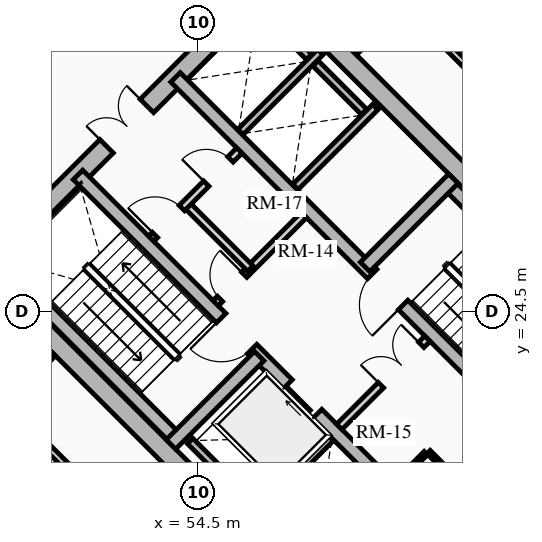
"""IFC4 building model, lengths in metres.
Left out: names, types, materials, properties, quantities, classifications, styles, units other than length and angle.
Written with IfcOpenShell. Run it as: python <this file> out.ifc"""

import sys

from ifc_helpers import new_model, si_unit, direction, frame, frame_2d, origin, place, context, subcontext, project, spatial, rectangle, extrude, source, transform, mapped, element, fill, save


model = new_model("IFC4")
c1 = context("Model", 3, precision=1e-05, world=origin(), true_north=direction((0.0, 1.0)))
c2 = subcontext(c1, "Body", "Model", "MODEL_VIEW")
j1 = project(units=[si_unit("LENGTHUNIT", "METRE"), si_unit("PLANEANGLEUNIT", "RADIAN")], contexts=[c1])
p1 = place(None, origin())
s1 = spatial("IfcSite", under=j1, at=p1, CompositionType="ELEMENT")
p2 = place(p1, origin())
s2 = spatial("IfcBuilding", under=s1, at=p2, CompositionType="ELEMENT")
p3 = place(p2, frame((0.0, 0.0, 65.65)))
s3 = spatial("IfcBuildingStorey", under=s2, at=p3, CompositionType="ELEMENT", Elevation=65.65)
for number, where, z_axis, x_axis in (
    (1, (58.773, 15.661, 0.0), (0.0, 0.0, 1.0), (-0.707, 0.707, 0.0)),
    (2, (66.339, 23.227, 0.0), (0.0, 0.0, 1.0), (-0.707, 0.707, 0.0)),
):
    element("IfcWall", number, at=place(p3, frame(where, z_axis=z_axis, x_axis=x_axis)), inside=s3, PredefinedType="SHEAR", context=c2, shape_type="SweptSolid", body=[
        extrude(rectangle(XDim=14.3, YDim=0.5, at=frame_2d((7.15, 0.0))), origin(), (0.0, 0.0, 1.0), 4.5),
    ])
p4 = place(p3, frame((58.596, 15.838, 0.0), z_axis=(0.0, 0.0, 1.0), x_axis=(0.707106781187, 0.707106781187, 0.0)))
e3 = element("IfcWall", 3, at=p4, inside=s3, PredefinedType="SHEAR", context=c2, shape_type="SweptSolid", body=[
    extrude(rectangle(XDim=10.7, YDim=0.5, at=frame_2d((5.35, 0.0))), origin(), (0.0, 0.0, 1.0), 4.5),
])
m1 = source(origin(), c2, "Body", "SweptSolid", [
    extrude(rectangle(XDim=1.5, YDim=2.02, at=frame_2d((0.75, 1.01))), frame((0.0, 0.26, 0.0), z_axis=(0.0, -1.0, 0.0), x_axis=(1.0, 0.0, 0.0)), (0.0, 0.0, 1.0), 0.52),
])
p5 = place(p4, frame((5.45, 0.0, 0.0)))
e4 = element("IfcOpeningElement", 4, at=p5, cuts=e3, PredefinedType="OPENING", context=c2, shape_type="MappedRepresentation", body=[
    mapped(m1, transform((0.0, 0.0, 0.0), x_axis=(1.0, 0.0, 0.0), y_axis=(0.0, 1.0, 0.0), z_axis=(0.0, 0.0, 1.0), scale=1.0)),
])
p6 = place(p3, frame((48.838, 25.596, 0.0), z_axis=(0.0, 0.0, 1.0), x_axis=(0.707106781187, 0.707106781187, 0.0)))
e5 = element("IfcWall", 5, at=p6, inside=s3, PredefinedType="SHEAR", context=c2, shape_type="SweptSolid", body=[
    extrude(rectangle(XDim=10.7, YDim=0.5, at=frame_2d((5.35, 0.0))), origin(), (0.0, 0.0, 1.0), 4.5),
])
p7 = place(p6, frame((4.6, 0.0, 0.0)))
e6 = element("IfcOpeningElement", 6, at=p7, cuts=e5, PredefinedType="OPENING", context=c2, shape_type="MappedRepresentation", body=[
    mapped(m1, transform((0.0, 0.0, 0.0), x_axis=(1.0, 0.0, 0.0), y_axis=(0.0, 1.0, 0.0), z_axis=(0.0, 0.0, 1.0), scale=1.0)),
])
p8 = place(p3, frame((61.096, 18.338, 0.0), z_axis=(0.0, 0.0, 1.0), x_axis=(-0.707106781187, 0.707106781187, 0.0)))
e7 = element("IfcWall", 7, at=p8, inside=s3, PredefinedType="SHEAR", context=c2, shape_type="SweptSolid", body=[
    extrude(rectangle(XDim=13.8, YDim=0.35, at=frame_2d((6.9, 0.0))), origin(), (0.0, 0.0, 1.0), 4.5),
])
m2 = source(origin(), c2, "Body", "SweptSolid", [
    extrude(rectangle(XDim=1.1, YDim=2.015, at=frame_2d((0.55, 1.007))), frame((0.0, 0.185, 0.0), z_axis=(0.0, -1.0, 0.0), x_axis=(1.0, 0.0, 0.0)), (0.0, 0.0, 1.0), 0.37),
])
p9 = place(p8, frame((4.9, 0.0, 0.0)))
e8 = element("IfcOpeningElement", 8, at=p9, cuts=e7, PredefinedType="OPENING", context=c2, shape_type="MappedRepresentation", body=[
    mapped(m2, transform((0.0, 0.0, 0.0), x_axis=(1.0, 0.0, 0.0), y_axis=(0.0, 1.0, 0.0), z_axis=(0.0, 0.0, 1.0), scale=1.0)),
])
m3 = source(origin(), c2, "Body", "SweptSolid", [
    extrude(rectangle(XDim=1.15, YDim=2.02, at=frame_2d((0.575, 1.01))), frame((0.0, 0.185, 0.0), z_axis=(0.0, -1.0, 0.0), x_axis=(1.0, 0.0, 0.0)), (0.0, 0.0, 1.0), 0.37),
])
p10 = place(p8, frame((7.32, 0.0, 0.0)))
e9 = element("IfcOpeningElement", 9, at=p10, cuts=e7, PredefinedType="OPENING", context=c2, shape_type="MappedRepresentation", body=[
    mapped(m3, transform((0.0, 0.0, 0.0), x_axis=(1.0, 0.0, 0.0), y_axis=(0.0, 1.0, 0.0), z_axis=(0.0, 0.0, 1.0), scale=1.0)),
])
p11 = place(p3, frame((63.662, 20.904, 0.0), z_axis=(0.0, 0.0, 1.0), x_axis=(-0.707106781187, 0.707106781187, 0.0)))
e10 = element("IfcWall", 10, at=p11, inside=s3, PredefinedType="SHEAR", context=c2, shape_type="SweptSolid", body=[
    extrude(rectangle(XDim=13.8, YDim=0.35, at=frame_2d((6.9, 0.0))), origin(), (0.0, 0.0, 1.0), 4.5),
])
p12 = place(p11, frame((5.33, 0.0, 0.0)))
e11 = element("IfcOpeningElement", 11, at=p12, cuts=e10, PredefinedType="OPENING", context=c2, shape_type="MappedRepresentation", body=[
    mapped(m3, transform((0.0, 0.0, 0.0), x_axis=(1.0, 0.0, 0.0), y_axis=(0.0, 1.0, 0.0), z_axis=(0.0, 0.0, 1.0), scale=1.0)),
])
p13 = place(p3, frame((53.922, 21.141, 0.0), z_axis=(0.0, 0.0, 1.0), x_axis=(-0.707106781187, 0.707106781187, 0.0)))
e12 = element("IfcWall", 12, at=p13, inside=s3, PredefinedType="SHEAR", context=c2, shape_type="SweptSolid", body=[
    extrude(rectangle(XDim=6.745, YDim=0.35, at=frame_2d((3.373, 0.0))), origin(), (0.0, 0.0, 1.0), 4.5),
])
p14 = place(p3, frame((53.784, 21.003, 0.0), z_axis=(0.0, 0.0, 1.0), x_axis=(0.707106781187, 0.707106781187, 0.0)))
e13 = element("IfcWall", 13, at=p14, inside=s3, PredefinedType="SHEAR", context=c2, shape_type="SweptSolid", body=[
    extrude(rectangle(XDim=3.285, YDim=0.35, at=frame_2d((1.643, 0.0))), origin(), (0.0, 0.0, 1.0), 4.5),
])
p15 = place(p3, frame((65.847, 23.089, 0.0), z_axis=(0.0, 0.0, 1.0), x_axis=(-0.707106781187, 0.707106781187, 0.0)))
e14 = element("IfcWall", 14, at=p15, inside=s3, PredefinedType="SHEAR", context=c2, shape_type="SweptSolid", body=[
    extrude(rectangle(XDim=6.745, YDim=0.35, at=frame_2d((3.373, 0.0))), origin(), (0.0, 0.0, 1.0), 4.5),
])
p16 = place(p3, frame((58.893, 25.674, 0.0), z_axis=(0.0, 0.0, 1.0), x_axis=(0.707106781187, 0.707106781187, 0.0)))
e15 = element("IfcWall", 15, at=p16, inside=s3, PredefinedType="SHEAR", context=c2, shape_type="SweptSolid", body=[
    extrude(rectangle(XDim=3.285, YDim=0.35, at=frame_2d((1.643, 0.0))), origin(), (0.0, 0.0, 1.0), 4.5),
])
p17 = place(p3, frame((55.888, 19.069, 0.0), z_axis=(0.0, 0.0, 1.0), x_axis=(0.707106781187, 0.707106781187, 0.0)))
e16 = element("IfcWall", 16, at=p17, inside=s3, PredefinedType="SHEAR", context=c2, shape_type="SweptSolid", body=[
    extrude(rectangle(XDim=2.97, YDim=0.2, at=frame_2d((1.485, 0.0))), origin(), (0.0, 0.0, 1.0), 4.5),
])
p18 = place(p3, frame((56.015, 19.366, 0.0), z_axis=(0.0, 0.0, 1.0), x_axis=(-0.707106781187, 0.707106781187, 0.0)))
e17 = element("IfcWall", 17, at=p18, inside=s3, PredefinedType="SHEAR", context=c2, shape_type="SweptSolid", body=[
    extrude(rectangle(XDim=2.44, YDim=0.2, at=frame_2d((1.22, 0.0))), origin(), (0.0, 0.0, 1.0), 4.5),
])
p19 = place(p3, frame((57.062, 27.781, 0.0), z_axis=(0.0, 0.0, 1.0), x_axis=(0.707106781187, 0.707106781187, 0.0)))
e18 = element("IfcWall", 18, at=p19, inside=s3, PredefinedType="SHEAR", context=c2, shape_type="SweptSolid", body=[
    extrude(rectangle(XDim=2.97, YDim=0.2, at=frame_2d((1.485, 0.0))), origin(), (0.0, 0.0, 1.0), 4.5),
])
p20 = place(p3, frame((55.615, 29.227, 0.0), z_axis=(0.0, 0.0, 1.0), x_axis=(0.707147878904, 0.70706568108, 0.0)))
e19 = element("IfcWall", 19, at=p20, inside=s3, PredefinedType="SHEAR", context=c2, shape_type="SweptSolid", body=[
    extrude(rectangle(XDim=2.97, YDim=0.2, at=frame_2d((1.485, 0.0))), origin(), (0.0, 0.0, 1.0), 4.5),
])
p21 = place(p3, frame((58.865, 29.754, 0.0), z_axis=(0.0, 0.0, 1.0), x_axis=(-0.707174411312, 0.707039144592, 0.0)))
e20 = element("IfcWall", 20, at=p21, inside=s3, PredefinedType="SHEAR", context=c2, shape_type="SweptSolid", body=[
    extrude(rectangle(XDim=1.805, YDim=0.2, at=frame_2d((0.902, 0.0))), origin(), (0.0, 0.0, 1.0), 4.5),
])
p22 = place(p3, frame((57.419, 31.2, 0.0), z_axis=(0.0, 0.0, 1.0), x_axis=(-0.707032117043, 0.707181437447, 0.0)))
e21 = element("IfcWall", 21, at=p22, inside=s3, PredefinedType="SHEAR", context=c2, shape_type="SweptSolid", body=[
    extrude(rectangle(XDim=1.635, YDim=0.2, at=frame_2d((0.817, 0.0))), origin(), (0.0, 0.0, 1.0), 4.5),
])
p23 = place(p3, frame((58.214, 21.467, 0.0), z_axis=(0.0, 0.0, 1.0), x_axis=(0.707106781187, 0.707106781187, 0.0)))
e22 = element("IfcWall", 22, at=p23, inside=s3, PredefinedType="PARTITIONING", context=c2, shape_type="SweptSolid", body=[
    extrude(rectangle(XDim=3.28, YDim=0.2, at=frame_2d((1.64, 0.0))), origin(), (0.0, 0.0, 1.0), 4.245),
])
m4 = source(origin(), c2, "Body", "SweptSolid", [
    extrude(rectangle(XDim=1.5, YDim=2.02, at=frame_2d((0.75, 1.01))), frame((0.0, 0.11, 0.0), z_axis=(0.0, -1.0, 0.0), x_axis=(1.0, 0.0, 0.0)), (0.0, 0.0, 1.0), 0.22),
])
p24 = place(p23, frame((1.55, 0.0, 0.0)))
e23 = element("IfcOpeningElement", 23, at=p24, cuts=e22, PredefinedType="OPENING", context=c2, shape_type="MappedRepresentation", body=[
    mapped(m4, transform((0.0, 0.0, 0.0), x_axis=(1.0, 0.0, 0.0), y_axis=(0.0, 1.0, 0.0), z_axis=(0.0, 0.0, 1.0), scale=1.0)),
])
p25 = place(p3, frame((54.961, 24.719, 0.0), z_axis=(0.0, 0.0, 1.0), x_axis=(0.707106781187, 0.707106781187, 0.0)))
e24 = element("IfcWall", 24, at=p25, inside=s3, PredefinedType="PARTITIONING", context=c2, shape_type="SweptSolid", body=[
    extrude(rectangle(XDim=3.28, YDim=0.2, at=frame_2d((1.64, 0.0))), origin(), (0.0, 0.0, 1.0), 4.245),
])
m5 = source(origin(), c2, "Body", "SweptSolid", [
    extrude(rectangle(XDim=0.9, YDim=2.005, at=frame_2d((0.45, 1.002))), frame((0.0, 0.11, 0.0), z_axis=(0.0, -1.0, 0.0), x_axis=(1.0, 0.0, 0.0)), (0.0, 0.0, 1.0), 0.22),
])
p26 = place(p25, frame((0.16, 0.0, 0.0)))
e25 = element("IfcOpeningElement", 25, at=p26, cuts=e24, PredefinedType="OPENING", context=c2, shape_type="MappedRepresentation", body=[
    mapped(m5, transform((0.0, 0.0, 0.0), x_axis=(1.0, 0.0, 0.0), y_axis=(0.0, 1.0, 0.0), z_axis=(0.0, 0.0, 1.0), scale=1.0)),
])
p27 = place(p3, frame((55.874, 25.631, 0.0), z_axis=(0.0, 0.0, 1.0), x_axis=(-0.707157639372, 0.707055919343, 0.0)))
e26 = element("IfcWall", 26, at=p27, inside=s3, PredefinedType="PARTITIONING", context=c2, shape_type="SweptSolid", body=[
    extrude(rectangle(XDim=2.4, YDim=0.2, at=frame_2d((1.2, 0.0))), origin(), (0.0, 0.0, 1.0), 4.245),
])
p28 = place(p3, frame((53.264, 26.416, 0.0), z_axis=(0.0, 0.0, 1.0), x_axis=(0.707106781187, 0.707106781187, 0.0)))
e27 = element("IfcWall", 27, at=p28, inside=s3, PredefinedType="PARTITIONING", context=c2, shape_type="SweptSolid", body=[
    extrude(rectangle(XDim=3.28, YDim=0.2, at=frame_2d((1.64, 0.0))), origin(), (0.0, 0.0, 1.0), 4.245),
])
m6 = source(origin(), c2, "Body", "SweptSolid", [
    extrude(rectangle(XDim=1.0, YDim=2.015, at=frame_2d((0.5, 1.007))), frame((0.0, 0.11, 0.0), z_axis=(0.0, -1.0, 0.0), x_axis=(1.0, 0.0, 0.0)), (0.0, 0.0, 1.0), 0.22),
])
p29 = place(p28, frame((0.14, 0.0, 0.0)))
e28 = element("IfcOpeningElement", 28, at=p29, cuts=e27, PredefinedType="OPENING", context=c2, shape_type="MappedRepresentation", body=[
    mapped(m6, transform((0.0, 0.0, 0.0), x_axis=(1.0, 0.0, 0.0), y_axis=(0.0, 1.0, 0.0), z_axis=(0.0, 0.0, 1.0), scale=1.0)),
])
p30 = place(p28, frame((2.05, 0.0, 0.0)))
e29 = element("IfcOpeningElement", 29, at=p30, cuts=e27, PredefinedType="OPENING", context=c2, shape_type="MappedRepresentation", body=[
    mapped(m5, transform((0.0, 0.0, 0.0), x_axis=(1.0, 0.0, 0.0), y_axis=(0.0, 1.0, 0.0), z_axis=(0.0, 0.0, 1.0), scale=1.0)),
])
p31 = place(p3, frame((61.835, 19.529, 0.0), z_axis=(0.0, 0.0, 1.0), x_axis=(-0.707174592913, 0.707038962956, 0.0)))
e30 = element("IfcWall", 30, at=p31, inside=s3, PredefinedType="PARTITIONING", context=c2, shape_type="SweptSolid", body=[
    extrude(rectangle(XDim=1.8, YDim=0.125, at=frame_2d((0.9, 0.0))), origin(), (0.0, 0.0, 1.0), 4.245),
])
m7 = source(origin(), c2, "Body", "SweptSolid", [
    extrude(rectangle(XDim=0.9, YDim=2.005, at=frame_2d((0.45, 1.002))), frame((0.0, 0.073, 0.0), z_axis=(0.0, -1.0, 0.0), x_axis=(1.0, 0.0, 0.0)), (0.0, 0.0, 1.0), 0.145),
])
p32 = place(p31, frame((0.42, 0.0, 0.0)))
e31 = element("IfcOpeningElement", 31, at=p32, cuts=e30, PredefinedType="OPENING", context=c2, shape_type="MappedRepresentation", body=[
    mapped(m7, transform((0.0, 0.0, 0.0), x_axis=(1.0, 0.0, 0.0), y_axis=(0.0, 1.0, 0.0), z_axis=(0.0, 0.0, 1.0), scale=1.0)),
])
p33 = place(p3, frame((59.713, 19.996, 0.0), z_axis=(0.0, 0.0, 1.0), x_axis=(0.707217726, 0.706995818963, 0.0)))
e32 = element("IfcWall", 32, at=p33, inside=s3, PredefinedType="PARTITIONING", context=c2, shape_type="SweptSolid", body=[
    extrude(rectangle(XDim=1.1, YDim=0.125, at=frame_2d((0.55, 0.0))), origin(), (0.0, 0.0, 1.0), 4.245),
])
p34 = place(p3, frame((58.419, 13.045, 0.0), z_axis=(0.0, 0.0, 1.0), x_axis=(0.707106781187, 0.707106781187, 0.0)))
e33 = element("IfcWall", 33, at=p34, inside=s3, PredefinedType="PARTITIONING", context=c2, shape_type="SweptSolid", body=[
    extrude(rectangle(XDim=14.9, YDim=0.18, at=frame_2d((7.45, 0.0))), origin(), (0.0, 0.0, 1.0), 3.536),
])
m8 = source(origin(), c2, "Body", "SweptSolid", [
    extrude(rectangle(XDim=1.4, YDim=2.02, at=frame_2d((0.7, 1.01))), frame((0.0, 0.1, 0.0), z_axis=(0.0, -1.0, 0.0), x_axis=(1.0, 0.0, 0.0)), (0.0, 0.0, 1.0), 0.2),
])
p35 = place(p34, frame((6.75, 0.0, 0.0)))
e34 = element("IfcOpeningElement", 34, at=p35, cuts=e33, PredefinedType="OPENING", context=c2, shape_type="MappedRepresentation", body=[
    mapped(m8, transform((0.0, 0.0, 0.0), x_axis=(1.0, 0.0, 0.0), y_axis=(0.0, 1.0, 0.0), z_axis=(0.0, 0.0, 1.0), scale=1.0)),
])
p36 = place(p3, frame((58.419, 13.045, 0.0), z_axis=(0.0, 0.0, 1.0), x_axis=(-0.707106781187, 0.707106781187, 0.0)))
e35 = element("IfcWall", 35, at=p36, inside=s3, PredefinedType="PARTITIONING", context=c2, shape_type="SweptSolid", body=[
    extrude(rectangle(XDim=12.8, YDim=0.18, at=frame_2d((6.4, 0.0))), origin(), (0.0, 0.0, 1.0), 3.536),
])
p37 = place(p36, frame((5.7, 0.0, 0.0)))
e36 = element("IfcOpeningElement", 36, at=p37, cuts=e35, PredefinedType="OPENING", context=c2, shape_type="MappedRepresentation", body=[
    mapped(m8, transform((0.0, 0.0, 0.0), x_axis=(1.0, 0.0, 0.0), y_axis=(0.0, 1.0, 0.0), z_axis=(0.0, 0.0, 1.0), scale=1.0)),
])
p38 = place(p3, frame((68.955, 23.581, 0.0), z_axis=(0.0, 0.0, 1.0), x_axis=(-0.707106781187, 0.707106781187, 0.0)))
e37 = element("IfcWall", 37, at=p38, inside=s3, PredefinedType="PARTITIONING", context=c2, shape_type="SweptSolid", body=[
    extrude(rectangle(XDim=12.8, YDim=0.18, at=frame_2d((6.4, 0.0))), origin(), (0.0, 0.0, 1.0), 3.536),
])
p39 = place(p38, frame((5.7, 0.0, 0.0)))
e38 = element("IfcOpeningElement", 38, at=p39, cuts=e37, PredefinedType="OPENING", context=c2, shape_type="MappedRepresentation", body=[
    mapped(m8, transform((0.0, 0.0, 0.0), x_axis=(1.0, 0.0, 0.0), y_axis=(0.0, 1.0, 0.0), z_axis=(0.0, 0.0, 1.0), scale=1.0)),
])
for number, where, z_axis, x_axis in (
    (39, (49.368, 22.096, 0.0), (0.0, 0.0, 1.0), (0.707, 0.707, 0.0)),
    (40, (58.596, 31.323, 0.0), (0.0, 0.0, 1.0), (0.707, 0.707, 0.0)),
):
    element("IfcWall", number, at=place(p3, frame(where, z_axis=z_axis, x_axis=x_axis)), inside=s3, PredefinedType="PARTITIONING", context=c2, shape_type="SweptSolid", body=[
        extrude(rectangle(XDim=1.85, YDim=0.2, at=frame_2d((0.925, 0.0))), origin(), (0.0, 0.0, 1.0), 4.245),
    ])
m9 = source(origin(), c2, "Body", "SweptSolid", [
    extrude(rectangle(XDim=1.1, YDim=2.015, at=frame_2d((0.55, 1.007))), frame((0.0, 0.025, 0.0), z_axis=(0.0, -1.0, 0.0), x_axis=(1.0, 0.0, 0.0)), (0.0, 0.0, 1.0), 0.05),
])
p40 = place(p9, origin())
e41 = element("IfcDoor", 41, at=p40, inside=s3, OperationType="SLIDING_TO_RIGHT", PredefinedType="DOOR", context=c2, shape_type="MappedRepresentation", body=[
    mapped(m9, transform((0.0, 0.0, 0.0), x_axis=(1.0, 0.0, 0.0), y_axis=(0.0, 1.0, 0.0), z_axis=(0.0, 0.0, 1.0), scale=1.0)),
])
fill(e8, e41)
m10 = source(origin(), c2, "Body", "SweptSolid", [
    extrude(rectangle(XDim=1.15, YDim=2.02, at=frame_2d((0.575, 1.01))), frame((0.0, 0.025, 0.0), z_axis=(0.0, -1.0, 0.0), x_axis=(1.0, 0.0, 0.0)), (0.0, 0.0, 1.0), 0.05),
])
p41 = place(p10, origin())
e42 = element("IfcDoor", 42, at=p41, inside=s3, OperationType="SINGLE_SWING_RIGHT", PredefinedType="DOOR", context=c2, shape_type="MappedRepresentation", body=[
    mapped(m10, transform((0.0, 0.0, 0.0), x_axis=(1.0, 0.0, 0.0), y_axis=(0.0, 1.0, 0.0), z_axis=(0.0, 0.0, 1.0), scale=1.0)),
])
fill(e9, e42)
p42 = place(p12, origin())
e43 = element("IfcDoor", 43, at=p42, inside=s3, OperationType="SINGLE_SWING_LEFT", PredefinedType="DOOR", context=c2, shape_type="MappedRepresentation", body=[
    mapped(m10, transform((0.0, 0.0, 0.0), x_axis=(1.0, 0.0, 0.0), y_axis=(0.0, 1.0, 0.0), z_axis=(0.0, 0.0, 1.0), scale=1.0)),
])
fill(e11, e43)
m11 = source(origin(), c2, "Body", "SweptSolid", [
    extrude(rectangle(XDim=1.5, YDim=2.02, at=frame_2d((0.75, 1.01))), frame((0.0, 0.025, 0.0), z_axis=(0.0, -1.0, 0.0), x_axis=(1.0, 0.0, 0.0)), (0.0, 0.0, 1.0), 0.05),
])
p43 = place(p7, origin())
e44 = element("IfcDoor", 44, at=p43, inside=s3, OperationType="DOUBLE_DOOR_SINGLE_SWING", PredefinedType="DOOR", context=c2, shape_type="MappedRepresentation", body=[
    mapped(m11, transform((0.0, 0.0, 0.0), x_axis=(1.0, 0.0, 0.0), y_axis=(0.0, 1.0, 0.0), z_axis=(0.0, 0.0, 1.0), scale=1.0)),
])
fill(e6, e44)
p44 = place(p24, origin())
e45 = element("IfcDoor", 45, at=p44, inside=s3, OperationType="DOUBLE_DOOR_SINGLE_SWING", PredefinedType="DOOR", context=c2, shape_type="MappedRepresentation", body=[
    mapped(m11, transform((0.0, 0.0, 0.0), x_axis=(1.0, 0.0, 0.0), y_axis=(0.0, 1.0, 0.0), z_axis=(0.0, 0.0, 1.0), scale=1.0)),
])
fill(e23, e45)
m12 = source(origin(), c2, "Body", "SweptSolid", [
    extrude(rectangle(XDim=0.9, YDim=2.005, at=frame_2d((0.45, 1.002))), frame((0.0, 0.025, 0.0), z_axis=(0.0, -1.0, 0.0), x_axis=(1.0, 0.0, 0.0)), (0.0, 0.0, 1.0), 0.05),
])
p45 = place(p26, origin())
e46 = element("IfcDoor", 46, at=p45, inside=s3, OperationType="SINGLE_SWING_RIGHT", PredefinedType="DOOR", context=c2, shape_type="MappedRepresentation", body=[
    mapped(m12, transform((0.0, 0.0, 0.0), x_axis=(1.0, 0.0, 0.0), y_axis=(0.0, 1.0, 0.0), z_axis=(0.0, 0.0, 1.0), scale=1.0)),
])
fill(e25, e46)
m13 = source(origin(), c2, "Body", "SweptSolid", [
    extrude(rectangle(XDim=1.0, YDim=2.015, at=frame_2d((0.5, 1.007))), frame((0.0, 0.025, 0.0), z_axis=(0.0, -1.0, 0.0), x_axis=(1.0, 0.0, 0.0)), (0.0, 0.0, 1.0), 0.05),
])
p46 = place(p29, origin())
e47 = element("IfcDoor", 47, at=p46, inside=s3, OperationType="SINGLE_SWING_LEFT", PredefinedType="DOOR", context=c2, shape_type="MappedRepresentation", body=[
    mapped(m13, transform((0.0, 0.0, 0.0), x_axis=(1.0, 0.0, 0.0), y_axis=(0.0, 1.0, 0.0), z_axis=(0.0, 0.0, 1.0), scale=1.0)),
])
fill(e28, e47)
p47 = place(p30, origin())
e48 = element("IfcDoor", 48, at=p47, inside=s3, OperationType="SINGLE_SWING_LEFT", PredefinedType="DOOR", context=c2, shape_type="MappedRepresentation", body=[
    mapped(m12, transform((0.0, 0.0, 0.0), x_axis=(1.0, 0.0, 0.0), y_axis=(0.0, 1.0, 0.0), z_axis=(0.0, 0.0, 1.0), scale=1.0)),
])
fill(e29, e48)
save(model, sys.argv[1])
